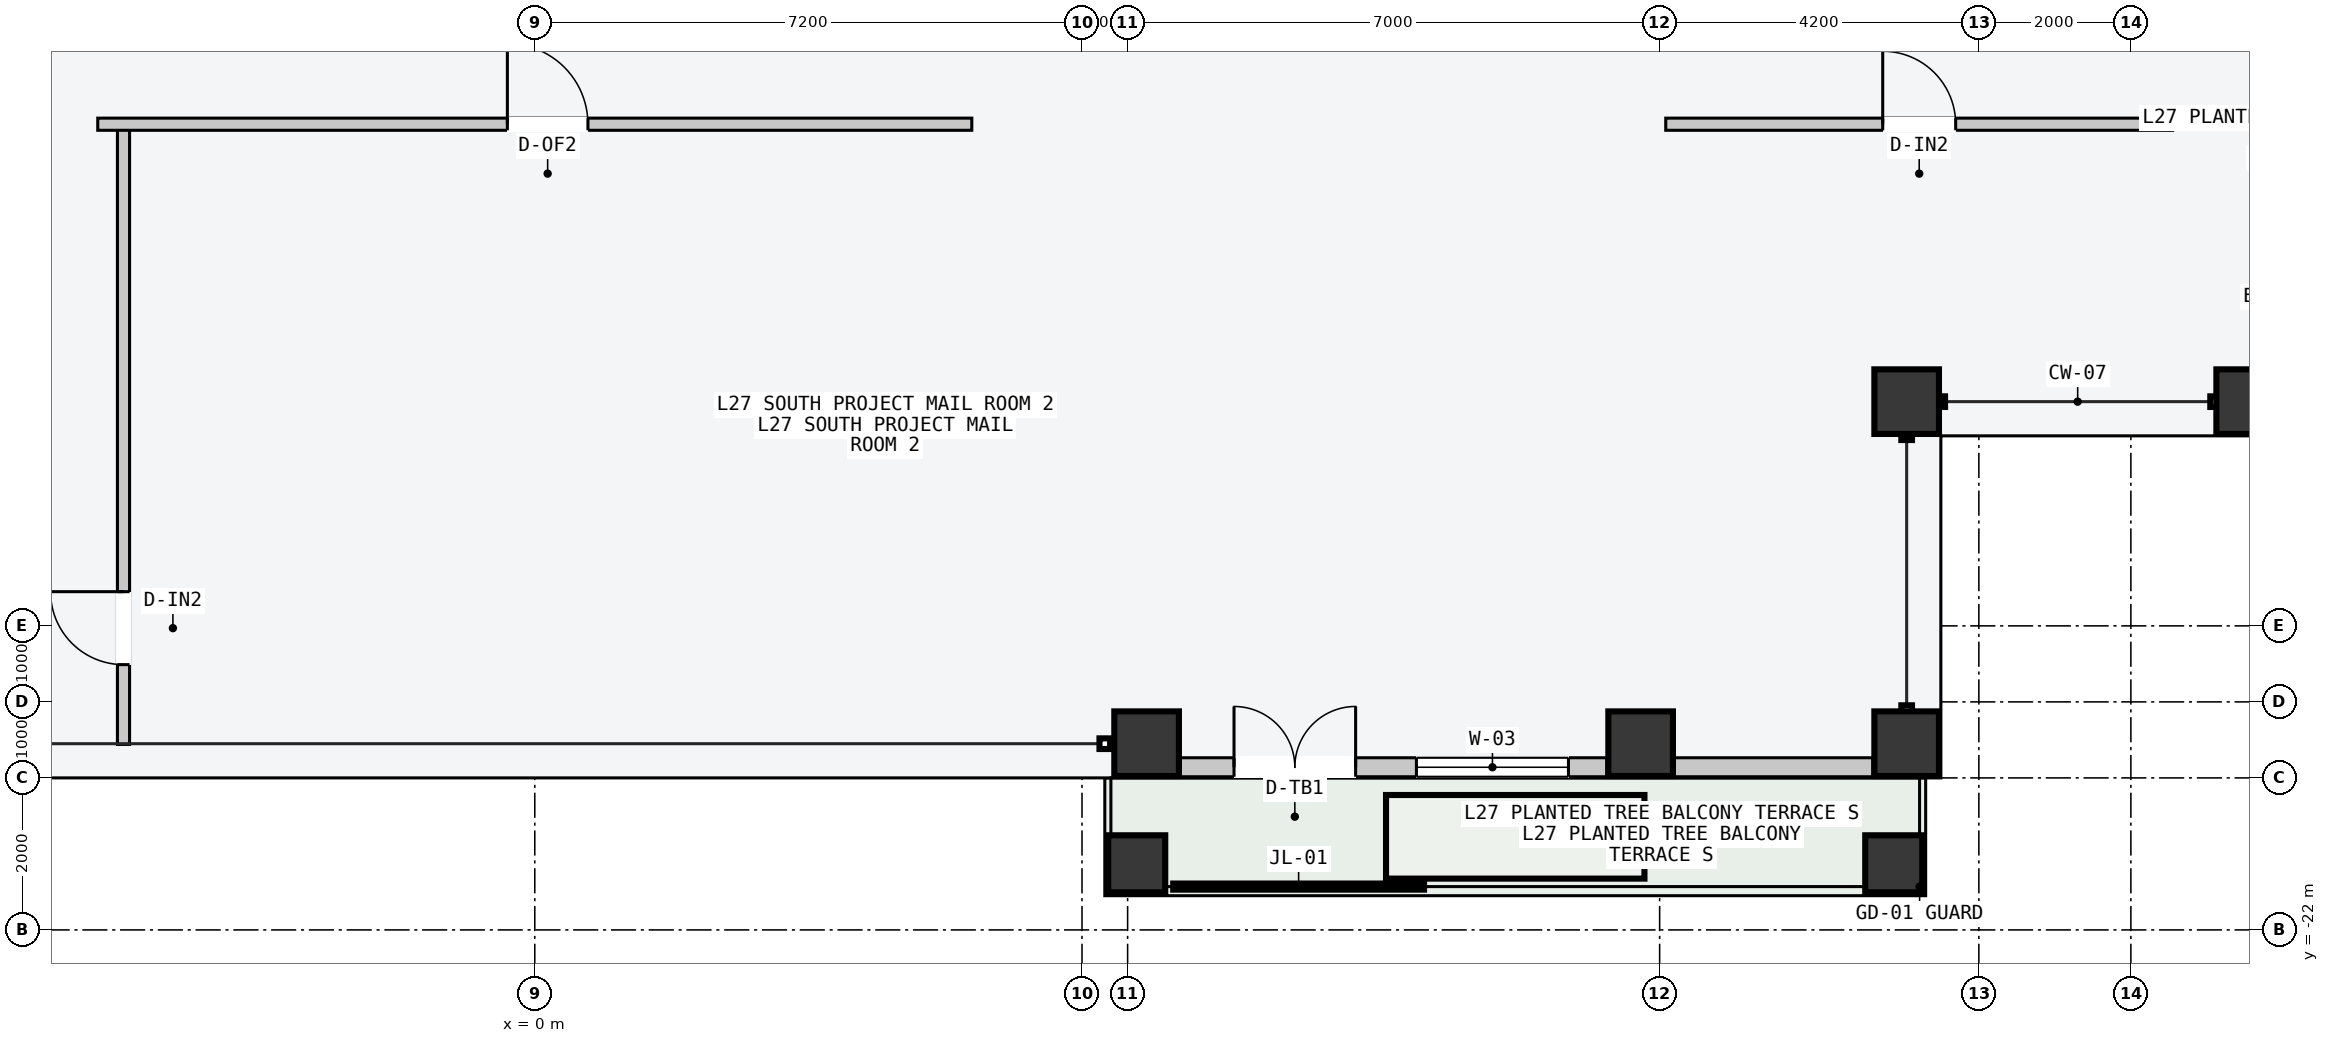
"""IFC4 building model, lengths in metres.
Left out: names, types, materials, properties, quantities, classifications, styles, units other than length and angle.
Written with IfcOpenShell. Run it as: python <this file> out.ifc"""

import sys

from ifc_helpers import new_model, si_unit, direction, frame, frame_2d, origin, origin_2d, place, context, subcontext, project, spatial, rectangle, hollow_rectangle, extrude, element, fill, save


model = new_model("IFC4")
c1 = context("Model", 3, precision=1e-05, world=origin(), true_north=direction((0.0, 1.0)))
c2 = subcontext(c1, "Body", "Model", "MODEL_VIEW")
j1 = project(units=[si_unit("LENGTHUNIT", "METRE"), si_unit("PLANEANGLEUNIT", "RADIAN")], contexts=[c1])
p1 = place(None, origin())
s1 = spatial("IfcSite", under=j1, at=p1, CompositionType="ELEMENT")
p2 = place(p1, origin())
s2 = spatial("IfcBuilding", under=s1, at=p2, CompositionType="ELEMENT")
p3 = place(p2, frame((0.0, 0.0, 106.2)))
s3 = spatial("IfcBuildingStorey", under=s2, at=p3, CompositionType="ELEMENT", Elevation=106.2)
for number, where, z_axis, x_axis in (
    (1, (8.05, -19.55, 0.0), (0.0, 0.0, 1.0), (1.0, 0.0, 0.0)),
    (2, (14.55, -19.55, 0.0), (0.0, 0.0, 1.0), (1.0, 0.0, 0.0)),
    (3, (18.05, -19.55, 0.0), (0.0, 0.0, 1.0), (1.0, 0.0, 0.0)),
    (4, (22.55, -15.05, 0.0), (0.0, 0.0, 1.0), (0.0, 1.0, 0.0)),
    (5, (18.05, -15.05, 0.0), (0.0, 0.0, 1.0), (1.0, 0.0, 0.0)),
):
    element("IfcColumn", number, at=place(p3, frame(where, z_axis=z_axis, x_axis=x_axis)), inside=s3, PredefinedType="COLUMN", context=c2, shape_type="SweptSolid", body=[
        extrude(hollow_rectangle(XDim=0.85, YDim=0.85, WallThickness=0.04, at=origin_2d()), origin(), (0.0, 0.0, 1.0), 3.6),
    ])
for number, where, z_axis, x_axis in (
    (6, (7.92, -21.13, 0.0), (0.0, 0.0, 1.0), (1.0, 0.0, 0.0)),
    (7, (17.88, -21.13, 0.0), (0.0, 0.0, 1.0), (1.0, 0.0, 0.0)),
):
    element("IfcColumn", number, at=place(p3, frame(where, z_axis=z_axis, x_axis=x_axis)), inside=s3, PredefinedType="COLUMN", context=c2, shape_type="SweptSolid", body=[
        extrude(hollow_rectangle(XDim=0.75, YDim=0.75, WallThickness=0.032, at=origin_2d()), origin(), (0.0, 0.0, 1.0), 3.6),
    ])
p4 = place(p3, frame((8.495, -19.86, 0.0), z_axis=(0.0, 0.0, 1.0), x_axis=(1.0, 0.0, 0.0)))
e8 = element("IfcWall", 8, at=p4, inside=s3, PredefinedType="STANDARD", context=c2, shape_type="SweptSolid", body=[
    extrude(rectangle(XDim=5.61, YDim=0.25, at=frame_2d((2.805, 0.0))), origin(), (0.0, 0.0, 1.0), 3.4),
])
p5 = place(p4, frame((0.705, 0.0, 0.0)))
e9 = element("IfcOpeningElement", 9, at=p5, cuts=e8, PredefinedType="OPENING", context=c2, shape_type="SweptSolid", body=[
    extrude(rectangle(XDim=1.6, YDim=2.2, at=frame_2d((0.8, 1.1))), frame((0.0, 0.135, 0.0), z_axis=(0.0, -1.0, 0.0), x_axis=(1.0, 0.0, 0.0)), (0.0, 0.0, 1.0), 0.27),
])
p6 = place(p4, frame((3.105, 0.0, 0.85)))
e10 = element("IfcOpeningElement", 10, at=p6, cuts=e8, PredefinedType="OPENING", context=c2, shape_type="SweptSolid", body=[
    extrude(rectangle(XDim=2.0, YDim=2.1, at=frame_2d((1.0, 1.05))), frame((0.0, 0.135, 0.0), z_axis=(0.0, -1.0, 0.0), x_axis=(1.0, 0.0, 0.0)), (0.0, 0.0, 1.0), 0.27),
])
p7 = place(p3, frame((14.995, -19.86, 0.0), z_axis=(0.0, 0.0, 1.0), x_axis=(1.0, 0.0, 0.0)))
e11 = element("IfcWall", 11, at=p7, inside=s3, PredefinedType="STANDARD", context=c2, shape_type="SweptSolid", body=[
    extrude(rectangle(XDim=2.61, YDim=0.25, at=frame_2d((1.305, 0.0))), origin(), (0.0, 0.0, 1.0), 3.4),
])
p8 = place(p3, frame((-5.411, -19.56, 0.0), z_axis=(0.0, 0.0, 1.0), x_axis=(0.0, 1.0, 0.0)))
e12 = element("IfcWall", 12, at=p8, inside=s3, PredefinedType="PARTITIONING", context=c2, shape_type="SweptSolid", body=[
    extrude(rectangle(XDim=8.1, YDim=0.16, at=frame_2d((4.05, 0.0))), origin(), (0.0, 0.0, 1.0), 3.4),
])
p9 = place(p8, frame((1.05, 0.0, 0.0)))
e13 = element("IfcOpeningElement", 13, at=p9, cuts=e12, PredefinedType="OPENING", context=c2, shape_type="SweptSolid", body=[
    extrude(rectangle(XDim=0.96, YDim=2.18, at=frame_2d((0.48, 1.09))), frame((0.0, 0.09, 0.0), z_axis=(0.0, -1.0, 0.0), x_axis=(1.0, 0.0, 0.0)), (0.0, 0.0, 1.0), 0.18),
])
p10 = place(p3, frame((-5.75, -11.4, 0.0), z_axis=(0.0, 0.0, 1.0), x_axis=(1.0, 0.0, 0.0)))
e14 = element("IfcWall", 14, at=p10, inside=s3, PredefinedType="PARTITIONING", context=c2, shape_type="SweptSolid", body=[
    extrude(rectangle(XDim=11.5, YDim=0.16, at=frame_2d((5.75, 0.0))), origin(), (0.0, 0.0, 1.0), 3.4),
])
p11 = place(p10, frame((5.389, 0.0, 0.0)))
e15 = element("IfcOpeningElement", 15, at=p11, cuts=e14, PredefinedType="OPENING", context=c2, shape_type="SweptSolid", body=[
    extrude(rectangle(XDim=1.06, YDim=2.2, at=frame_2d((0.53, 1.1))), frame((0.0, 0.09, 0.0), z_axis=(0.0, -1.0, 0.0), x_axis=(1.0, 0.0, 0.0)), (0.0, 0.0, 1.0), 0.18),
])
p12 = place(p3, frame((14.88, -11.4, 0.0), z_axis=(0.0, 0.0, 1.0), x_axis=(1.0, 0.0, 0.0)))
e16 = element("IfcWall", 16, at=p12, inside=s3, PredefinedType="PARTITIONING", context=c2, shape_type="SweptSolid", body=[
    extrude(rectangle(XDim=6.67, YDim=0.16, at=frame_2d((3.335, 0.0))), origin(), (0.0, 0.0, 1.0), 3.4),
])
p13 = place(p12, frame((2.855, 0.0, 0.0)))
e17 = element("IfcOpeningElement", 17, at=p13, cuts=e16, PredefinedType="OPENING", context=c2, shape_type="SweptSolid", body=[
    extrude(rectangle(XDim=0.96, YDim=2.18, at=frame_2d((0.48, 1.09))), frame((0.0, 0.09, 0.0), z_axis=(0.0, -1.0, 0.0), x_axis=(1.0, 0.0, 0.0)), (0.0, 0.0, 1.0), 0.18),
])
p14 = place(p5, origin())
e18 = element("IfcDoor", 18, at=p14, inside=s3, OperationType="DOUBLE_DOOR_SINGLE_SWING", PredefinedType="DOOR", context=c2, shape_type="SweptSolid", body=[
    extrude(rectangle(XDim=1.6, YDim=2.2, at=frame_2d((0.8, 1.1))), frame((0.0, 0.025, 0.0), z_axis=(0.0, -1.0, 0.0), x_axis=(1.0, 0.0, 0.0)), (0.0, 0.0, 1.0), 0.05),
])
fill(e9, e18)
p15 = place(p6, origin())
e19 = element("IfcWindow", 19, at=p15, inside=s3, PartitioningType="SINGLE_PANEL", PredefinedType="WINDOW", context=c2, shape_type="SweptSolid", body=[
    extrude(rectangle(XDim=2.0, YDim=2.1, at=frame_2d((1.0, 1.05))), frame((0.0, 0.03, 0.0), z_axis=(0.0, -1.0, 0.0), x_axis=(1.0, 0.0, 0.0)), (0.0, 0.0, 1.0), 0.06),
])
fill(e10, e19)
p16 = place(p9, origin())
e20 = element("IfcDoor", 20, at=p16, inside=s3, OperationType="SINGLE_SWING_RIGHT", PredefinedType="DOOR", context=c2, shape_type="SweptSolid", body=[
    extrude(rectangle(XDim=0.96, YDim=2.18, at=frame_2d((0.48, 1.09))), frame((0.0, 0.025, 0.0), z_axis=(0.0, -1.0, 0.0), x_axis=(1.0, 0.0, 0.0)), (0.0, 0.0, 1.0), 0.05),
])
fill(e13, e20)
p17 = place(p11, origin())
e21 = element("IfcDoor", 21, at=p17, inside=s3, OperationType="SINGLE_SWING_LEFT", PredefinedType="DOOR", context=c2, shape_type="SweptSolid", body=[
    extrude(rectangle(XDim=1.06, YDim=2.2, at=frame_2d((0.53, 1.1))), frame((0.0, 0.025, 0.0), z_axis=(0.0, -1.0, 0.0), x_axis=(1.0, 0.0, 0.0)), (0.0, 0.0, 1.0), 0.05),
])
fill(e15, e21)
p18 = place(p13, origin())
e22 = element("IfcDoor", 22, at=p18, inside=s3, OperationType="SINGLE_SWING_LEFT", PredefinedType="DOOR", context=c2, shape_type="SweptSolid", body=[
    extrude(rectangle(XDim=0.96, YDim=2.18, at=frame_2d((0.48, 1.09))), frame((0.0, 0.025, 0.0), z_axis=(0.0, -1.0, 0.0), x_axis=(1.0, 0.0, 0.0)), (0.0, 0.0, 1.0), 0.05),
])
fill(e17, e22)
save(model, sys.argv[1])
